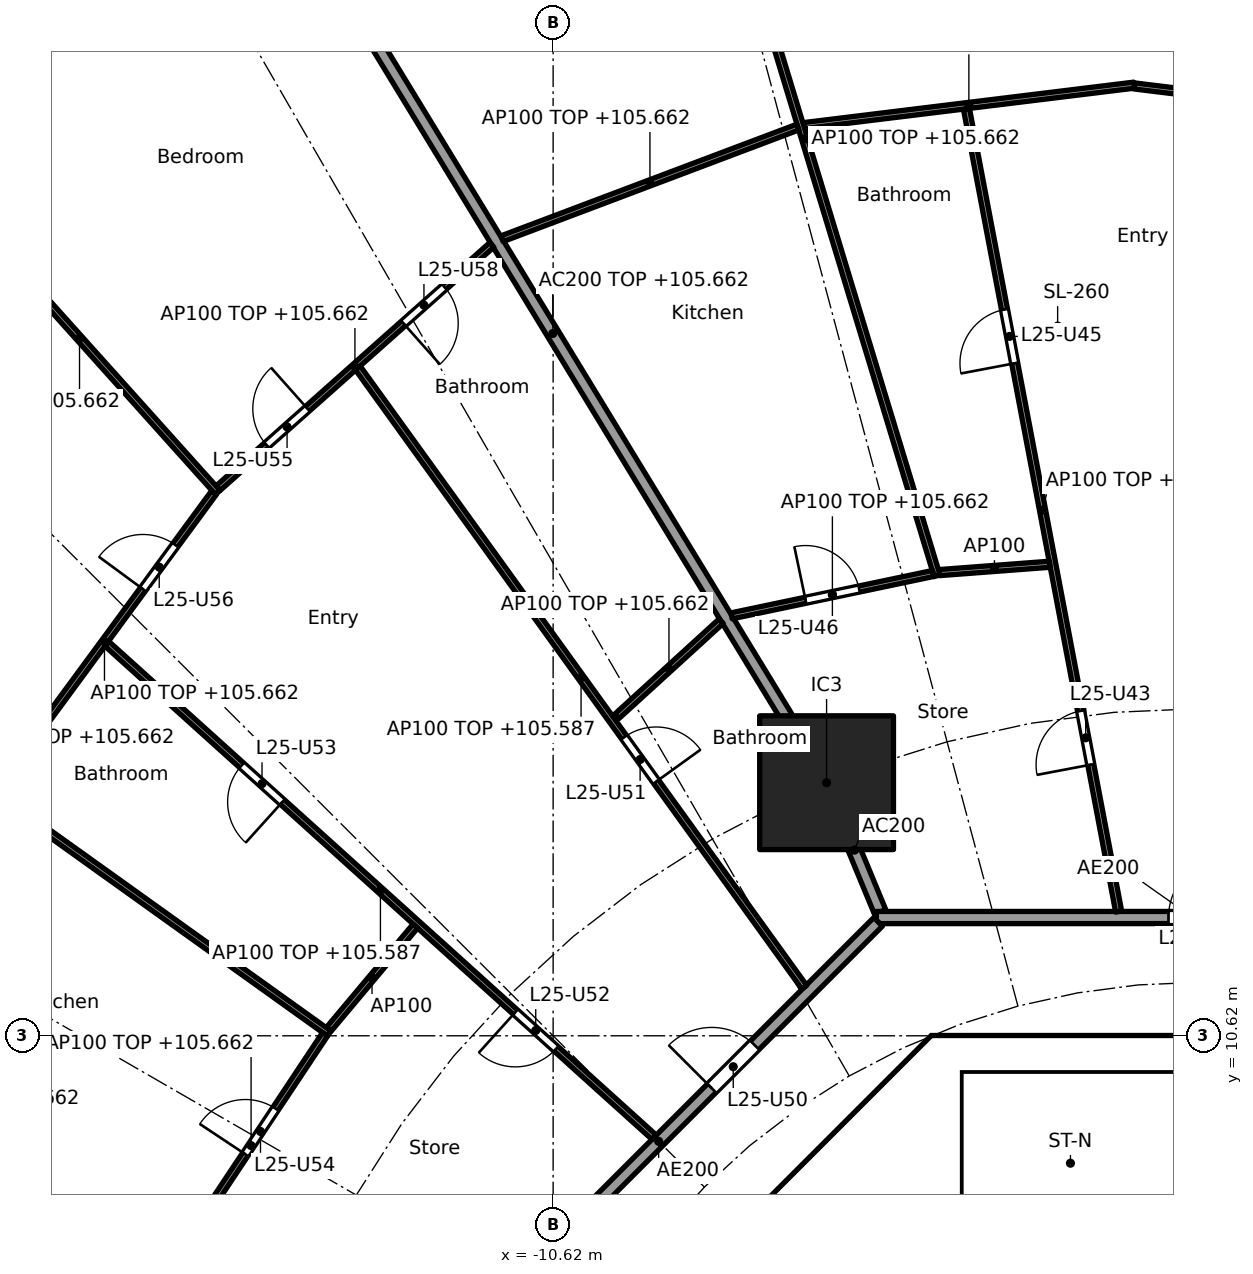
"""IFC4 building model, lengths in metres.
Left out: names, types, materials, properties, quantities, classifications, styles, units other than length and angle.
Written with IfcOpenShell. Run it as: python <this file> out.ifc"""

import sys

from ifc_helpers import new_model, si_unit, direction, frame, frame_2d, origin, origin_2d, place, context, subcontext, project, spatial, polyline, rectangle, outline, extrude, element, fill, save


model = new_model("IFC4")
c1 = context("Model", 3, precision=1e-05, world=origin(), true_north=direction((0.0, 1.0)))
c2 = subcontext(c1, "Body", "Model", "MODEL_VIEW")
j1 = project(units=[si_unit("LENGTHUNIT", "METRE"), si_unit("PLANEANGLEUNIT", "RADIAN")], contexts=[c1])
p1 = place(None, origin())
s1 = spatial("IfcSite", under=j1, at=p1, CompositionType="ELEMENT")
p2 = place(p1, origin())
s2 = spatial("IfcBuilding", under=s1, at=p2, CompositionType="ELEMENT")
p3 = place(p2, frame((0.0, 0.0, 102.9)))
s3 = spatial("IfcBuildingStorey", under=s2, at=p3, CompositionType="ELEMENT", Elevation=102.9)
p4 = place(p3, frame((-6.123, 14.782, 0.0), z_axis=(0.0, 0.0, 1.0), x_axis=(1.0, 0.0, 0.0)))
e1 = element("IfcColumn", 1, at=p4, inside=s3, PredefinedType="COLUMN", context=c2, shape_type="SweptSolid", body=[
    extrude(rectangle(XDim=2.2, YDim=2.2, at=origin_2d()), origin(), (0.0, 0.0, 1.0), 3.7),
])
p5 = place(p3, frame((-4.613, 9.988, 0.0), z_axis=(0.0, 0.0, 1.0), x_axis=(-0.707106781187, -0.707106781187, 0.0)))
e2 = element("IfcWall", 2, at=p5, inside=s3, PredefinedType="SHEAR", context=c2, shape_type="SweptSolid", body=[
    extrude(rectangle(XDim=7.602, YDim=0.6, at=frame_2d((3.801, 0.0))), origin(), (0.0, 0.0, 1.0), 3.44),
])
p6 = place(p5, frame((0.351, 0.0, 0.0)))
e3 = element("IfcOpeningElement", 3, at=p6, cuts=e2, PredefinedType="OPENING", context=c2, shape_type="SweptSolid", body=[
    extrude(rectangle(XDim=1.1, YDim=2.1, at=frame_2d((0.55, 1.05))), frame((0.0, 0.31, 0.0), z_axis=(0.0, -1.0, 0.0), x_axis=(1.0, 0.0, 0.0)), (0.0, 0.0, 1.0), 0.62),
])
p7 = place(p3, frame((-5.8, 4.3, 0.0), z_axis=(0.0, 0.0, 1.0), x_axis=(0.0, 1.0, 0.0)))
e4 = element("IfcWall", 4, at=p7, inside=s3, PredefinedType="PARTITIONING", context=c2, shape_type="SweptSolid", body=[
    extrude(rectangle(XDim=3.927, YDim=0.15, at=frame_2d((1.963, 0.0))), origin(), (0.0, 0.0, 1.0), 3.44),
])
p8 = place(p7, frame((0.413, 0.0, 0.0)))
e5 = element("IfcOpeningElement", 5, at=p8, cuts=e4, PredefinedType="OPENING", context=c2, shape_type="SweptSolid", body=[
    extrude(rectangle(XDim=0.9, YDim=2.1, at=frame_2d((0.45, 1.05))), frame((0.0, 0.085, 0.0), z_axis=(0.0, -1.0, 0.0), x_axis=(1.0, 0.0, 0.0)), (0.0, 0.0, 1.0), 0.17),
])
p9 = place(p7, frame((2.489, 0.0, 0.0)))
e6 = element("IfcOpeningElement", 6, at=p9, cuts=e4, PredefinedType="OPENING", context=c2, shape_type="SweptSolid", body=[
    extrude(rectangle(XDim=0.9, YDim=2.1, at=frame_2d((0.45, 1.05))), frame((0.0, 0.085, 0.0), z_axis=(0.0, -1.0, 0.0), x_axis=(1.0, 0.0, 0.0)), (0.0, 0.0, 1.0), 0.17),
])
p10 = place(p3, origin())
e7 = element("IfcWall", 7, at=p10, inside=s3, PredefinedType="SHEAR", context=c2, shape_type="SweptSolid", body=[
    extrude(outline(polyline([(-4.152, 10.025), (-4.401, 9.776), (-4.825, 10.2), (-4.401, 10.625), (4.401, 10.625), (4.825, 10.2), (4.401, 9.776), (4.152, 10.025), (-4.152, 10.025)])), origin(), (0.0, 0.0, 1.0), 3.44),
])
p11 = place(p3, origin())
e8 = element("IfcWall", 8, at=p11, inside=s3, PredefinedType="SOLIDWALL", context=c2, shape_type="SweptSolid", body=[
    extrude(outline(polyline([(-3.9, 7.025), (-4.1, 7.025), (-4.1, 10.025), (-3.9, 10.025), (-3.9, 7.025)])), origin(), (0.0, 0.0, 1.0), 3.44),
])
p12 = place(p3, frame((-5.243, 12.657, 0.0), z_axis=(0.0, 0.0, 1.0), x_axis=(-0.38273085373, 0.923859888513, 0.0)))
e9 = element("IfcWall", 9, at=p12, inside=s3, PredefinedType="PARTITIONING", context=c2, shape_type="SweptSolid", body=[
    extrude(rectangle(XDim=2.199, YDim=0.2, at=frame_2d((1.1, 0.0))), origin(), (0.0, 0.0, 1.0), 3.44),
])
p13 = place(p3, frame((-6.149, 14.825, 0.0), z_axis=(0.0, 0.0, 1.0), x_axis=(-0.520412862249, 0.853914780763, 0.0)))
e10 = element("IfcWall", 10, at=p13, inside=s3, PredefinedType="PARTITIONING", context=c2, shape_type="SweptSolid", body=[
    extrude(rectangle(XDim=17.202, YDim=0.2, at=frame_2d((8.601, 0.0))), origin(), (0.0, 0.0, 1.0), 2.762),
])
p14 = place(p3, frame((-14.829, 6.14, 0.0), z_axis=(0.0, 0.0, 1.0), x_axis=(-0.936597324342, 0.35040755134, 0.0)))
e11 = element("IfcWall", 11, at=p14, inside=s3, PredefinedType="PARTITIONING", context=c2, shape_type="SweptSolid", body=[
    extrude(rectangle(XDim=13.606, YDim=0.2, at=frame_2d((6.803, 0.0))), origin(), (0.0, 0.0, 1.0), 2.762),
])
p15 = place(p3, frame((5.104, 12.565, 0.0), z_axis=(0.0, 0.0, 1.0), x_axis=(-1.0, 0.0, 0.0)))
e12 = element("IfcWall", 12, at=p15, inside=s3, PredefinedType="PARTITIONING", context=c2, shape_type="SweptSolid", body=[
    extrude(rectangle(XDim=10.409, YDim=0.2, at=frame_2d((5.205, 0.0))), origin(), (0.0, 0.0, 1.0), 3.44),
])
p16 = place(p15, frame((4.604, 0.0, 0.0)))
e13 = element("IfcOpeningElement", 13, at=p16, cuts=e12, PredefinedType="OPENING", context=c2, shape_type="SweptSolid", body=[
    extrude(rectangle(XDim=1.0, YDim=2.1, at=frame_2d((0.5, 1.05))), frame((0.0, 0.11, 0.0), z_axis=(0.0, -1.0, 0.0), x_axis=(1.0, 0.0, 0.0)), (0.0, 0.0, 1.0), 0.22),
])
p17 = place(p3, frame((-5.275, 12.494, 0.0), z_axis=(0.0, 0.0, 1.0), x_axis=(-0.707106781187, -0.707106781187, 0.0)))
e14 = element("IfcWall", 14, at=p17, inside=s3, PredefinedType="PARTITIONING", context=c2, shape_type="SweptSolid", body=[
    extrude(rectangle(XDim=10.209, YDim=0.2, at=frame_2d((5.104, 0.0))), origin(), (0.0, 0.0, 1.0), 3.44),
])
p18 = place(p17, frame((2.87, 0.0, 0.0)))
e15 = element("IfcOpeningElement", 15, at=p18, cuts=e14, PredefinedType="OPENING", context=c2, shape_type="SweptSolid", body=[
    extrude(rectangle(XDim=1.0, YDim=2.1, at=frame_2d((0.5, 1.05))), frame((0.0, 0.11, 0.0), z_axis=(0.0, -1.0, 0.0), x_axis=(1.0, 0.0, 0.0)), (0.0, 0.0, 1.0), 0.22),
])
p19 = place(p3, frame((4.267, 25.587, 0.0), z_axis=(0.0, 0.0, 1.0), x_axis=(-0.992576206119, 0.121624319302, 0.0)))
e16 = element("IfcWall", 16, at=p19, inside=s3, PredefinedType="PARTITIONING", context=c2, shape_type="SweptSolid", body=[
    extrude(rectangle(XDim=5.374, YDim=0.1, at=frame_2d((2.687, 0.0))), origin(), (0.0, 0.0, 1.0), 2.762),
])
p20 = place(p3, frame((-1.066, 26.253, 0.0), z_axis=(0.0, 0.0, 1.0), x_axis=(-0.992574853421, -0.121635358166, 0.0)))
e17 = element("IfcWall", 17, at=p20, inside=s3, PredefinedType="PARTITIONING", context=c2, shape_type="SweptSolid", body=[
    extrude(rectangle(XDim=5.473, YDim=0.1, at=frame_2d((2.737, 0.0))), origin(), (0.0, 0.0, 1.0), 2.762),
])
p21 = place(p3, frame((-1.32, 12.663, 0.0), z_axis=(0.0, 0.0, 1.0), x_axis=(-0.186308855238, 0.982491226658, 0.0)))
e18 = element("IfcWall", 18, at=p21, inside=s3, PredefinedType="PARTITIONING", context=c2, shape_type="SweptSolid", body=[
    extrude(rectangle(XDim=13.437, YDim=0.1, at=frame_2d((6.719, 0.0))), origin(), (0.0, 0.0, 1.0), 2.687),
])
p22 = place(p21, frame((2.458, 0.0, 0.0)))
e19 = element("IfcOpeningElement", 19, at=p22, cuts=e18, PredefinedType="OPENING", context=c2, shape_type="SweptSolid", body=[
    extrude(rectangle(XDim=0.9, YDim=2.1, at=frame_2d((0.45, 1.05))), frame((0.0, 0.06, 0.0), z_axis=(0.0, -1.0, 0.0), x_axis=(1.0, 0.0, 0.0)), (0.0, 0.0, 1.0), 0.12),
])
p23 = place(p21, frame((9.177, 0.0, 0.0)))
e20 = element("IfcOpeningElement", 20, at=p23, cuts=e18, PredefinedType="OPENING", context=c2, shape_type="SweptSolid", body=[
    extrude(rectangle(XDim=0.9, YDim=2.1, at=frame_2d((0.45, 1.05))), frame((0.0, 0.06, 0.0), z_axis=(0.0, -1.0, 0.0), x_axis=(1.0, 0.0, 0.0)), (0.0, 0.0, 1.0), 0.12),
])
p24 = place(p3, frame((-2.453, 18.374, 0.0), z_axis=(0.0, 0.0, 1.0), x_axis=(-0.997153681897, -0.075395853197, 0.0)))
e21 = element("IfcWall", 21, at=p24, inside=s3, PredefinedType="PARTITIONING", context=c2, shape_type="SweptSolid", body=[
    extrude(rectangle(XDim=1.823, YDim=0.1, at=frame_2d((0.912, 0.0))), origin(), (0.0, 0.0, 1.0), 3.44),
])
p25 = place(p3, frame((-4.306, 18.185, 0.0), z_axis=(0.0, 0.0, 1.0), x_axis=(-0.290183838394, 0.956970919064, 0.0)))
e22 = element("IfcWall", 22, at=p25, inside=s3, PredefinedType="PARTITIONING", context=c2, shape_type="SweptSolid", body=[
    extrude(rectangle(XDim=15.015, YDim=0.1, at=frame_2d((7.508, 0.0))), origin(), (0.0, 0.0, 1.0), 2.762),
])
p26 = place(p25, frame((10.922, 0.0, 0.0)))
e23 = element("IfcOpeningElement", 23, at=p26, cuts=e22, PredefinedType="OPENING", context=c2, shape_type="SweptSolid", body=[
    extrude(rectangle(XDim=0.9, YDim=2.1, at=frame_2d((0.45, 1.05))), frame((0.0, 0.06, 0.0), z_axis=(0.0, -1.0, 0.0), x_axis=(1.0, 0.0, 0.0)), (0.0, 0.0, 1.0), 0.12),
])
p27 = place(p3, frame((-4.37, 18.223, 0.0), z_axis=(0.0, 0.0, 1.0), x_axis=(-0.978633053291, -0.205614559323, 0.0)))
e24 = element("IfcWall", 24, at=p27, inside=s3, PredefinedType="PARTITIONING", context=c2, shape_type="SweptSolid", body=[
    extrude(rectangle(XDim=3.387, YDim=0.1, at=frame_2d((1.694, 0.0))), origin(), (0.0, 0.0, 1.0), 2.762),
])
p28 = place(p27, frame((1.244, 0.0, 0.0)))
e25 = element("IfcOpeningElement", 25, at=p28, cuts=e24, PredefinedType="OPENING", context=c2, shape_type="SweptSolid", body=[
    extrude(rectangle(XDim=0.9, YDim=2.1, at=frame_2d((0.45, 1.05))), frame((0.0, 0.06, 0.0), z_axis=(0.0, -1.0, 0.0), x_axis=(1.0, 0.0, 0.0)), (0.0, 0.0, 1.0), 0.12),
])
p29 = place(p3, frame((-6.596, 25.563, 0.0), z_axis=(0.0, 0.0, 1.0), x_axis=(-0.935624838262, -0.352995980185, 0.0)))
e26 = element("IfcWall", 26, at=p29, inside=s3, PredefinedType="PARTITIONING", context=c2, shape_type="SweptSolid", body=[
    extrude(rectangle(XDim=5.199, YDim=0.1, at=frame_2d((2.6, 0.0))), origin(), (0.0, 0.0, 1.0), 2.762),
])
p30 = place(p3, frame((-7.857, 17.438, 0.0), z_axis=(0.0, 0.0, 1.0), x_axis=(-0.738883513135, -0.673833179665, 0.0)))
e27 = element("IfcWall", 27, at=p30, inside=s3, PredefinedType="PARTITIONING", context=c2, shape_type="SweptSolid", body=[
    extrude(rectangle(XDim=2.323, YDim=0.1, at=frame_2d((1.162, 0.0))), origin(), (0.0, 0.0, 1.0), 2.762),
])
p31 = place(p3, frame((-11.628, 23.626, 0.0), z_axis=(0.0, 0.0, 1.0), x_axis=(-0.747429444005, -0.664341197153, 0.0)))
e28 = element("IfcWall", 28, at=p31, inside=s3, PredefinedType="PARTITIONING", context=c2, shape_type="SweptSolid", body=[
    extrude(rectangle(XDim=6.024, YDim=0.1, at=frame_2d((3.012, 0.0))), origin(), (0.0, 0.0, 1.0), 2.762),
])
p32 = place(p31, frame((4.055, 0.0, 0.0)))
e29 = element("IfcOpeningElement", 29, at=p32, cuts=e28, PredefinedType="OPENING", context=c2, shape_type="SweptSolid", body=[
    extrude(rectangle(XDim=0.9, YDim=2.1, at=frame_2d((0.45, 1.05))), frame((0.0, 0.06, 0.0), z_axis=(0.0, -1.0, 0.0), x_axis=(1.0, 0.0, 0.0)), (0.0, 0.0, 1.0), 0.12),
])
p33 = place(p31, frame((1.043, 0.0, 0.0)))
e30 = element("IfcOpeningElement", 30, at=p33, cuts=e28, PredefinedType="OPENING", context=c2, shape_type="SweptSolid", body=[
    extrude(rectangle(XDim=0.9, YDim=2.1, at=frame_2d((0.45, 1.05))), frame((0.0, 0.06, 0.0), z_axis=(0.0, -1.0, 0.0), x_axis=(1.0, 0.0, 0.0)), (0.0, 0.0, 1.0), 0.12),
])
p34 = place(p3, frame((-6.49, 11.419, 0.0), z_axis=(0.0, 0.0, 1.0), x_axis=(-0.584832823883, 0.811153849839, 0.0)))
e31 = element("IfcWall", 31, at=p34, inside=s3, PredefinedType="PARTITIONING", context=c2, shape_type="SweptSolid", body=[
    extrude(rectangle(XDim=12.553, YDim=0.1, at=frame_2d((6.277, 0.0))), origin(), (0.0, 0.0, 1.0), 2.687),
])
p35 = place(p34, frame((4.166, 0.0, 0.0)))
e32 = element("IfcOpeningElement", 32, at=p35, cuts=e31, PredefinedType="OPENING", context=c2, shape_type="SweptSolid", body=[
    extrude(rectangle(XDim=0.9, YDim=2.1, at=frame_2d((0.45, 1.05))), frame((0.0, 0.06, 0.0), z_axis=(0.0, -1.0, 0.0), x_axis=(1.0, 0.0, 0.0)), (0.0, 0.0, 1.0), 0.12),
])
p36 = place(p3, frame((-16.134, 19.554, 0.0), z_axis=(0.0, 0.0, 1.0), x_axis=(-0.667985610263, 0.74417418961, 0.0)))
e33 = element("IfcWall", 33, at=p36, inside=s3, PredefinedType="PARTITIONING", context=c2, shape_type="SweptSolid", body=[
    extrude(rectangle(XDim=6.809, YDim=0.1, at=frame_2d((3.405, 0.0))), origin(), (0.0, 0.0, 1.0), 2.762),
])
p37 = place(p3, frame((-16.197, 19.551, 0.0), z_axis=(0.0, 0.0, 1.0), x_axis=(-0.592391983588, -0.80564988536, 0.0)))
e34 = element("IfcWall", 34, at=p37, inside=s3, PredefinedType="PARTITIONING", context=c2, shape_type="SweptSolid", body=[
    extrude(rectangle(XDim=6.08, YDim=0.1, at=frame_2d((3.04, 0.0))), origin(), (0.0, 0.0, 1.0), 2.762),
])
p38 = place(p37, frame((1.07, 0.0, 0.0)))
e35 = element("IfcOpeningElement", 35, at=p38, cuts=e34, PredefinedType="OPENING", context=c2, shape_type="SweptSolid", body=[
    extrude(rectangle(XDim=0.9, YDim=2.1, at=frame_2d((0.45, 1.05))), frame((0.0, 0.06, 0.0), z_axis=(0.0, -1.0, 0.0), x_axis=(1.0, 0.0, 0.0)), (0.0, 0.0, 1.0), 0.12),
])
p39 = place(p3, frame((-8.959, 8.952, 0.0), z_axis=(0.0, 0.0, 1.0), x_axis=(-0.742679904999, 0.669646592398, 0.0)))
e36 = element("IfcWall", 36, at=p39, inside=s3, PredefinedType="PARTITIONING", context=c2, shape_type="SweptSolid", body=[
    extrude(rectangle(XDim=12.121, YDim=0.1, at=frame_2d((6.061, 0.0))), origin(), (0.0, 0.0, 1.0), 2.687),
])
p40 = place(p39, frame((2.172, 0.0, 0.0)))
e37 = element("IfcOpeningElement", 37, at=p40, cuts=e36, PredefinedType="OPENING", context=c2, shape_type="SweptSolid", body=[
    extrude(rectangle(XDim=0.9, YDim=2.1, at=frame_2d((0.45, 1.05))), frame((0.0, 0.06, 0.0), z_axis=(0.0, -1.0, 0.0), x_axis=(1.0, 0.0, 0.0)), (0.0, 0.0, 1.0), 0.12),
])
p41 = place(p39, frame((8.233, 0.0, 0.0)))
e38 = element("IfcOpeningElement", 38, at=p41, cuts=e36, PredefinedType="OPENING", context=c2, shape_type="SweptSolid", body=[
    extrude(rectangle(XDim=0.9, YDim=2.1, at=frame_2d((0.45, 1.05))), frame((0.0, 0.06, 0.0), z_axis=(0.0, -1.0, 0.0), x_axis=(1.0, 0.0, 0.0)), (0.0, 0.0, 1.0), 0.12),
])
p42 = place(p3, frame((-12.885, 12.425, 0.0), z_axis=(0.0, 0.0, 1.0), x_axis=(-0.642551826067, -0.766242227248, 0.0)))
e39 = element("IfcWall", 39, at=p42, inside=s3, PredefinedType="PARTITIONING", context=c2, shape_type="SweptSolid", body=[
    extrude(rectangle(XDim=2.219, YDim=0.1, at=frame_2d((1.109, 0.0))), origin(), (0.0, 0.0, 1.0), 3.44),
])
p43 = place(p3, frame((-14.302, 10.657, 0.0), z_axis=(0.0, 0.0, 1.0), x_axis=(-0.813183002698, 0.582008079087, 0.0)))
e40 = element("IfcWall", 40, at=p43, inside=s3, PredefinedType="PARTITIONING", context=c2, shape_type="SweptSolid", body=[
    extrude(rectangle(XDim=13.074, YDim=0.1, at=frame_2d((6.537, 0.0))), origin(), (0.0, 0.0, 1.0), 2.762),
])
p44 = place(p43, frame((9.485, 0.0, 0.0)))
e41 = element("IfcOpeningElement", 41, at=p44, cuts=e40, PredefinedType="OPENING", context=c2, shape_type="SweptSolid", body=[
    extrude(rectangle(XDim=0.9, YDim=2.1, at=frame_2d((0.45, 1.05))), frame((0.0, 0.06, 0.0), z_axis=(0.0, -1.0, 0.0), x_axis=(1.0, 0.0, 0.0)), (0.0, 0.0, 1.0), 0.12),
])
p45 = place(p3, frame((-14.371, 10.645, 0.0), z_axis=(0.0, 0.0, 1.0), x_axis=(-0.553341009285, -0.832954817168, 0.0)))
e42 = element("IfcWall", 42, at=p45, inside=s3, PredefinedType="PARTITIONING", context=c2, shape_type="SweptSolid", body=[
    extrude(rectangle(XDim=4.396, YDim=0.1, at=frame_2d((2.198, 0.0))), origin(), (0.0, 0.0, 1.0), 2.762),
])
p46 = place(p45, frame((1.469, 0.0, 0.0)))
e43 = element("IfcOpeningElement", 43, at=p46, cuts=e42, PredefinedType="OPENING", context=c2, shape_type="SweptSolid", body=[
    extrude(rectangle(XDim=0.9, YDim=2.1, at=frame_2d((0.45, 1.05))), frame((0.0, 0.06, 0.0), z_axis=(0.0, -1.0, 0.0), x_axis=(1.0, 0.0, 0.0)), (0.0, 0.0, 1.0), 0.12),
])
p47 = place(p6, origin())
e44 = element("IfcDoor", 44, at=p47, inside=s3, OperationType="SINGLE_SWING_LEFT", PredefinedType="DOOR", context=c2, shape_type="SweptSolid", body=[
    extrude(rectangle(XDim=1.1, YDim=2.1, at=frame_2d((0.55, 1.05))), frame((0.0, 0.025, 0.0), z_axis=(0.0, -1.0, 0.0), x_axis=(1.0, 0.0, 0.0)), (0.0, 0.0, 1.0), 0.05),
])
fill(e3, e44)
p48 = place(p16, frame((1.0, 0.0, 0.0), x_axis=(-1.0, 0.0, 0.0)))
e45 = element("IfcDoor", 45, at=p48, inside=s3, OperationType="SINGLE_SWING_RIGHT", PredefinedType="DOOR", context=c2, shape_type="SweptSolid", body=[
    extrude(rectangle(XDim=1.0, YDim=2.1, at=frame_2d((0.5, 1.05))), frame((0.0, 0.025, 0.0), z_axis=(0.0, -1.0, 0.0), x_axis=(1.0, 0.0, 0.0)), (0.0, 0.0, 1.0), 0.05),
])
fill(e13, e45)
p49 = place(p22, origin())
e46 = element("IfcDoor", 46, at=p49, inside=s3, OperationType="SINGLE_SWING_LEFT", PredefinedType="DOOR", context=c2, shape_type="SweptSolid", body=[
    extrude(rectangle(XDim=0.9, YDim=2.1, at=frame_2d((0.45, 1.05))), frame((0.0, 0.025, 0.0), z_axis=(0.0, -1.0, 0.0), x_axis=(1.0, 0.0, 0.0)), (0.0, 0.0, 1.0), 0.05),
])
fill(e19, e46)
p50 = place(p23, origin())
e47 = element("IfcDoor", 47, at=p50, inside=s3, OperationType="SINGLE_SWING_LEFT", PredefinedType="DOOR", context=c2, shape_type="SweptSolid", body=[
    extrude(rectangle(XDim=0.9, YDim=2.1, at=frame_2d((0.45, 1.05))), frame((0.0, 0.025, 0.0), z_axis=(0.0, -1.0, 0.0), x_axis=(1.0, 0.0, 0.0)), (0.0, 0.0, 1.0), 0.05),
])
fill(e20, e47)
p51 = place(p28, frame((0.9, 0.0, 0.0), x_axis=(-1.0, 0.0, 0.0)))
e48 = element("IfcDoor", 48, at=p51, inside=s3, OperationType="SINGLE_SWING_LEFT", PredefinedType="DOOR", context=c2, shape_type="SweptSolid", body=[
    extrude(rectangle(XDim=0.9, YDim=2.1, at=frame_2d((0.45, 1.05))), frame((0.0, 0.025, 0.0), z_axis=(0.0, -1.0, 0.0), x_axis=(1.0, 0.0, 0.0)), (0.0, 0.0, 1.0), 0.05),
])
fill(e25, e48)
p52 = place(p18, frame((1.0, 0.0, 0.0), x_axis=(-1.0, 0.0, 0.0)))
e49 = element("IfcDoor", 49, at=p52, inside=s3, OperationType="SINGLE_SWING_LEFT", PredefinedType="DOOR", context=c2, shape_type="SweptSolid", body=[
    extrude(rectangle(XDim=1.0, YDim=2.1, at=frame_2d((0.5, 1.05))), frame((0.0, 0.025, 0.0), z_axis=(0.0, -1.0, 0.0), x_axis=(1.0, 0.0, 0.0)), (0.0, 0.0, 1.0), 0.05),
])
fill(e15, e49)
p53 = place(p35, frame((0.9, 0.0, 0.0), x_axis=(-1.0, 0.0, 0.0)))
e50 = element("IfcDoor", 50, at=p53, inside=s3, OperationType="SINGLE_SWING_RIGHT", PredefinedType="DOOR", context=c2, shape_type="SweptSolid", body=[
    extrude(rectangle(XDim=0.9, YDim=2.1, at=frame_2d((0.45, 1.05))), frame((0.0, 0.025, 0.0), z_axis=(0.0, -1.0, 0.0), x_axis=(1.0, 0.0, 0.0)), (0.0, 0.0, 1.0), 0.05),
])
fill(e32, e50)
p54 = place(p40, origin())
e51 = element("IfcDoor", 51, at=p54, inside=s3, OperationType="SINGLE_SWING_RIGHT", PredefinedType="DOOR", context=c2, shape_type="SweptSolid", body=[
    extrude(rectangle(XDim=0.9, YDim=2.1, at=frame_2d((0.45, 1.05))), frame((0.0, 0.025, 0.0), z_axis=(0.0, -1.0, 0.0), x_axis=(1.0, 0.0, 0.0)), (0.0, 0.0, 1.0), 0.05),
])
fill(e37, e51)
p55 = place(p41, origin())
e52 = element("IfcDoor", 52, at=p55, inside=s3, OperationType="SINGLE_SWING_LEFT", PredefinedType="DOOR", context=c2, shape_type="SweptSolid", body=[
    extrude(rectangle(XDim=0.9, YDim=2.1, at=frame_2d((0.45, 1.05))), frame((0.0, 0.025, 0.0), z_axis=(0.0, -1.0, 0.0), x_axis=(1.0, 0.0, 0.0)), (0.0, 0.0, 1.0), 0.05),
])
fill(e38, e52)
p56 = place(p46, frame((0.9, 0.0, 0.0), x_axis=(-1.0, 0.0, 0.0)))
e53 = element("IfcDoor", 53, at=p56, inside=s3, OperationType="SINGLE_SWING_LEFT", PredefinedType="DOOR", context=c2, shape_type="SweptSolid", body=[
    extrude(rectangle(XDim=0.9, YDim=2.1, at=frame_2d((0.45, 1.05))), frame((0.0, 0.025, 0.0), z_axis=(0.0, -1.0, 0.0), x_axis=(1.0, 0.0, 0.0)), (0.0, 0.0, 1.0), 0.05),
])
fill(e43, e53)
p57 = place(p32, frame((0.9, 0.0, 0.0), x_axis=(-1.0, 0.0, 0.0)))
e54 = element("IfcDoor", 54, at=p57, inside=s3, OperationType="SINGLE_SWING_RIGHT", PredefinedType="DOOR", context=c2, shape_type="SweptSolid", body=[
    extrude(rectangle(XDim=0.9, YDim=2.1, at=frame_2d((0.45, 1.05))), frame((0.0, 0.025, 0.0), z_axis=(0.0, -1.0, 0.0), x_axis=(1.0, 0.0, 0.0)), (0.0, 0.0, 1.0), 0.05),
])
fill(e29, e54)
p58 = place(p38, frame((0.9, 0.0, 0.0), x_axis=(-1.0, 0.0, 0.0)))
e55 = element("IfcDoor", 55, at=p58, inside=s3, OperationType="SINGLE_SWING_LEFT", PredefinedType="DOOR", context=c2, shape_type="SweptSolid", body=[
    extrude(rectangle(XDim=0.9, YDim=2.1, at=frame_2d((0.45, 1.05))), frame((0.0, 0.025, 0.0), z_axis=(0.0, -1.0, 0.0), x_axis=(1.0, 0.0, 0.0)), (0.0, 0.0, 1.0), 0.05),
])
fill(e35, e55)
p59 = place(p33, origin())
e56 = element("IfcDoor", 56, at=p59, inside=s3, OperationType="SINGLE_SWING_RIGHT", PredefinedType="DOOR", context=c2, shape_type="SweptSolid", body=[
    extrude(rectangle(XDim=0.9, YDim=2.1, at=frame_2d((0.45, 1.05))), frame((0.0, 0.025, 0.0), z_axis=(0.0, -1.0, 0.0), x_axis=(1.0, 0.0, 0.0)), (0.0, 0.0, 1.0), 0.05),
])
fill(e30, e56)
save(model, sys.argv[1])
